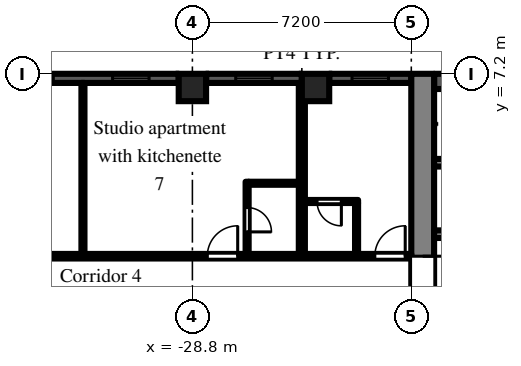
"""IFC4 building model, lengths in metres.
Left out: names, types, materials, properties, quantities, classifications, styles, units other than length and angle.
Written with IfcOpenShell. Run it as: python <this file> out.ifc"""

import sys

from ifc_helpers import new_model, si_unit, direction, frame, frame_2d, origin, origin_2d, place, context, subcontext, project, spatial, rectangle, extrude, element, fill, save


model = new_model("IFC4")
c1 = context("Model", 3, precision=1e-05, world=origin(), true_north=direction((0.0, 1.0)))
c2 = subcontext(c1, "Body", "Model", "MODEL_VIEW")
j1 = project(units=[si_unit("LENGTHUNIT", "METRE"), si_unit("PLANEANGLEUNIT", "RADIAN")], contexts=[c1])
p1 = place(None, origin())
s1 = spatial("IfcSite", under=j1, at=p1, CompositionType="ELEMENT")
p2 = place(p1, origin())
s2 = spatial("IfcBuilding", under=s1, at=p2, CompositionType="ELEMENT")
p3 = place(p2, frame((0.0, 0.0, 59.7)))
s3 = spatial("IfcBuildingStorey", under=s2, at=p3, CompositionType="ELEMENT", Elevation=59.7)
for number, where, z_axis, x_axis in (
    (1, (-28.8, 6.75, 0.0), (0.0, 0.0, 1.0), (1.0, 0.0, 0.0)),
    (2, (-24.75, 6.75, 0.0), (0.0, 0.0, 1.0), (1.0, 0.0, 0.0)),
):
    element("IfcColumn", number, at=place(p3, frame(where, z_axis=z_axis, x_axis=x_axis)), inside=s3, PredefinedType="COLUMN", context=c2, shape_type="SweptSolid", body=[
        extrude(rectangle(XDim=0.9, YDim=0.9, at=origin_2d()), origin(), (0.0, 0.0, 1.0), 3.0),
    ])
p4 = place(p3, frame((-21.6, 7.05, 0.0), z_axis=(0.0, 0.0, 1.0), x_axis=(-1.0, 0.0, 0.0)))
e3 = element("IfcWall", 3, at=p4, inside=s3, PredefinedType="SOLIDWALL", context=c2, shape_type="SweptSolid", body=[
    extrude(rectangle(XDim=2.7, YDim=0.3, at=frame_2d((1.35, 0.0))), origin(), (0.0, 0.0, 1.0), 2.1),
])
p5 = place(p4, frame((0.75, 0.0, 0.2)))
e4 = element("IfcOpeningElement", 4, at=p5, cuts=e3, PredefinedType="OPENING", context=c2, shape_type="SweptSolid", body=[
    extrude(rectangle(XDim=1.2, YDim=1.85, at=frame_2d((0.6, 0.925))), frame((0.0, 0.16, 0.0), z_axis=(0.0, -1.0, 0.0), x_axis=(1.0, 0.0, 0.0)), (0.0, 0.0, 1.0), 0.32),
])
p6 = place(p3, frame((-25.2, 7.05, 0.0), z_axis=(0.0, 0.0, 1.0), x_axis=(-1.0, 0.0, 0.0)))
e5 = element("IfcWall", 5, at=p6, inside=s3, PredefinedType="SOLIDWALL", context=c2, shape_type="SweptSolid", body=[
    extrude(rectangle(XDim=3.15, YDim=0.3, at=frame_2d((1.575, 0.0))), origin(), (0.0, 0.0, 1.0), 2.1),
])
p7 = place(p6, frame((0.975, 0.0, 0.2)))
e6 = element("IfcOpeningElement", 6, at=p7, cuts=e5, PredefinedType="OPENING", context=c2, shape_type="SweptSolid", body=[
    extrude(rectangle(XDim=1.2, YDim=1.85, at=frame_2d((0.6, 0.925))), frame((0.0, 0.16, 0.0), z_axis=(0.0, -1.0, 0.0), x_axis=(1.0, 0.0, 0.0)), (0.0, 0.0, 1.0), 0.32),
])
p8 = place(p3, frame((-29.25, 7.05, 0.0), z_axis=(0.0, 0.0, 1.0), x_axis=(-1.0, 0.0, 0.0)))
e7 = element("IfcWall", 7, at=p8, inside=s3, PredefinedType="SOLIDWALL", context=c2, shape_type="SweptSolid", body=[
    extrude(rectangle(XDim=6.3, YDim=0.3, at=frame_2d((3.15, 0.0))), origin(), (0.0, 0.0, 1.0), 2.1),
])
p9 = place(p8, frame((0.975, 0.0, 0.2)))
e8 = element("IfcOpeningElement", 8, at=p9, cuts=e7, PredefinedType="OPENING", context=c2, shape_type="SweptSolid", body=[
    extrude(rectangle(XDim=1.2, YDim=1.85, at=frame_2d((0.6, 0.925))), frame((0.0, 0.16, 0.0), z_axis=(0.0, -1.0, 0.0), x_axis=(1.0, 0.0, 0.0)), (0.0, 0.0, 1.0), 0.32),
])
p10 = place(p8, frame((4.125, 0.0, 0.2)))
e9 = element("IfcOpeningElement", 9, at=p10, cuts=e7, PredefinedType="OPENING", context=c2, shape_type="SweptSolid", body=[
    extrude(rectangle(XDim=1.2, YDim=1.85, at=frame_2d((0.6, 0.925))), frame((0.0, 0.16, 0.0), z_axis=(0.0, -1.0, 0.0), x_axis=(1.0, 0.0, 0.0)), (0.0, 0.0, 1.0), 0.32),
])
p11 = place(p3, frame((-21.225, -7.2, 0.0), z_axis=(0.0, 0.0, 1.0), x_axis=(0.0, 1.0, 0.0)))
e10 = element("IfcWall", 10, at=p11, inside=s3, PredefinedType="SHEAR", context=c2, shape_type="SweptSolid", body=[
    extrude(rectangle(XDim=14.4, YDim=0.75, at=frame_2d((7.2, 0.0))), origin(), (0.0, 0.0, 1.0), 2.55),
])
p12 = place(p11, frame((6.0, 0.0, 0.0)))
e11 = element("IfcOpeningElement", 11, at=p12, cuts=e10, PredefinedType="OPENING", context=c2, shape_type="SweptSolid", body=[
    extrude(rectangle(XDim=2.4, YDim=2.2, at=frame_2d((1.2, 1.1))), frame((0.0, 0.385, 0.0), z_axis=(0.0, -1.0, 0.0), x_axis=(1.0, 0.0, 0.0)), (0.0, 0.0, 1.0), 0.77),
])
p13 = place(p3, frame((-7.9, 6.95, 0.0), z_axis=(0.0, 0.0, 1.0), x_axis=(-1.0, 0.0, 0.0)))
e12 = element("IfcWall", 12, at=p13, inside=s3, PredefinedType="SHEAR", context=c2, shape_type="SweptSolid", body=[
    extrude(rectangle(XDim=12.95, YDim=0.5, at=frame_2d((6.475, 0.0))), origin(), (0.0, 0.0, 1.0), 2.55),
])
p14 = place(p3, frame((-7.9, 1.925, 0.0), z_axis=(0.0, 0.0, 1.0), x_axis=(-1.0, 0.0, 0.0)))
e13 = element("IfcWall", 13, at=p14, inside=s3, PredefinedType="SHEAR", context=c2, shape_type="SweptSolid", body=[
    extrude(rectangle(XDim=12.95, YDim=0.25, at=frame_2d((6.475, 0.0))), origin(), (0.0, 0.0, 1.0), 2.55),
])
p15 = place(p14, frame((0.525, 0.0, 0.0)))
e14 = element("IfcOpeningElement", 14, at=p15, cuts=e13, PredefinedType="OPENING", context=c2, shape_type="SweptSolid", body=[
    extrude(rectangle(XDim=0.9, YDim=2.1, at=frame_2d((0.45, 1.05))), frame((0.0, 0.135, 0.0), z_axis=(0.0, -1.0, 0.0), x_axis=(1.0, 0.0, 0.0)), (0.0, 0.0, 1.0), 0.27),
])
p16 = place(p14, frame((2.625, 0.0, 0.0)))
e15 = element("IfcOpeningElement", 15, at=p16, cuts=e13, PredefinedType="OPENING", context=c2, shape_type="SweptSolid", body=[
    extrude(rectangle(XDim=1.1, YDim=2.1, at=frame_2d((0.55, 1.05))), frame((0.0, 0.135, 0.0), z_axis=(0.0, -1.0, 0.0), x_axis=(1.0, 0.0, 0.0)), (0.0, 0.0, 1.0), 0.27),
])
p17 = place(p14, frame((6.025, 0.0, 0.0)))
e16 = element("IfcOpeningElement", 16, at=p17, cuts=e13, PredefinedType="OPENING", context=c2, shape_type="SweptSolid", body=[
    extrude(rectangle(XDim=0.9, YDim=2.1, at=frame_2d((0.45, 1.05))), frame((0.0, 0.135, 0.0), z_axis=(0.0, -1.0, 0.0), x_axis=(1.0, 0.0, 0.0)), (0.0, 0.0, 1.0), 0.27),
])
p18 = place(p14, frame((9.325, 0.0, 0.0)))
e17 = element("IfcOpeningElement", 17, at=p18, cuts=e13, PredefinedType="OPENING", context=c2, shape_type="SweptSolid", body=[
    extrude(rectangle(XDim=0.9, YDim=2.1, at=frame_2d((0.45, 1.05))), frame((0.0, 0.135, 0.0), z_axis=(0.0, -1.0, 0.0), x_axis=(1.0, 0.0, 0.0)), (0.0, 0.0, 1.0), 0.27),
])
p19 = place(p3, frame((-12.3, 4.275, 0.0), z_axis=(0.0, 0.0, 1.0), x_axis=(-1.0, 0.0, 0.0)))
e18 = element("IfcWall", 18, at=p19, inside=s3, PredefinedType="SHEAR", context=c2, shape_type="SweptSolid", body=[
    extrude(rectangle(XDim=8.55, YDim=0.25, at=frame_2d((4.275, 0.0))), origin(), (0.0, 0.0, 1.0), 2.55),
])
p20 = place(p3, frame((-36.5, 1.2, 0.0), z_axis=(0.0, 0.0, 1.0), x_axis=(1.0, 0.0, 0.0)))
e19 = element("IfcWall", 19, at=p20, inside=s3, PredefinedType="PARTITIONING", context=c2, shape_type="SweptSolid", body=[
    extrude(rectangle(XDim=14.9, YDim=0.15, at=frame_2d((7.45, 0.0))), origin(), (0.0, 0.0, 1.0), 2.55),
])
p21 = place(p20, frame((13.7, 0.0, 0.0)))
e20 = element("IfcOpeningElement", 20, at=p21, cuts=e19, PredefinedType="OPENING", context=c2, shape_type="SweptSolid", body=[
    extrude(rectangle(XDim=1.0, YDim=2.1, at=frame_2d((0.5, 1.05))), frame((0.0, 0.085, 0.0), z_axis=(0.0, -1.0, 0.0), x_axis=(1.0, 0.0, 0.0)), (0.0, 0.0, 1.0), 0.17),
])
p22 = place(p20, frame((8.19, 0.0, 0.0)))
e21 = element("IfcOpeningElement", 21, at=p22, cuts=e19, PredefinedType="OPENING", context=c2, shape_type="SweptSolid", body=[
    extrude(rectangle(XDim=1.0, YDim=2.1, at=frame_2d((0.5, 1.05))), frame((0.0, 0.085, 0.0), z_axis=(0.0, -1.0, 0.0), x_axis=(1.0, 0.0, 0.0)), (0.0, 0.0, 1.0), 0.17),
])
p23 = place(p20, frame((1.15, 0.0, 0.0)))
e22 = element("IfcOpeningElement", 22, at=p23, cuts=e19, PredefinedType="OPENING", context=c2, shape_type="SweptSolid", body=[
    extrude(rectangle(XDim=1.8, YDim=2.1, at=frame_2d((0.9, 1.05))), frame((0.0, 0.085, 0.0), z_axis=(0.0, -1.0, 0.0), x_axis=(1.0, 0.0, 0.0)), (0.0, 0.0, 1.0), 0.17),
])
p24 = place(p3, frame((-32.4, 1.275, 0.0), z_axis=(0.0, 0.0, 1.0), x_axis=(0.0, 1.0, 0.0)))
e23 = element("IfcWall", 23, at=p24, inside=s3, PredefinedType="PARTITIONING", context=c2, shape_type="SweptSolid", body=[
    extrude(rectangle(XDim=5.625, YDim=0.1, at=frame_2d((2.812, 0.0))), origin(), (0.0, 0.0, 1.0), 2.55),
])
p25 = place(p3, frame((-27.0, 1.275, 0.0), z_axis=(0.0, 0.0, 1.0), x_axis=(0.0, 1.0, 0.0)))
e24 = element("IfcWall", 24, at=p25, inside=s3, PredefinedType="PARTITIONING", context=c2, shape_type="SweptSolid", body=[
    extrude(rectangle(XDim=2.375, YDim=0.1, at=frame_2d((1.188, 0.0))), origin(), (0.0, 0.0, 1.0), 2.55),
])
p26 = place(p25, frame((0.725, 0.0, 0.0)))
e25 = element("IfcOpeningElement", 25, at=p26, cuts=e24, PredefinedType="OPENING", context=c2, shape_type="SweptSolid", body=[
    extrude(rectangle(XDim=0.8, YDim=2.1, at=frame_2d((0.4, 1.05))), frame((0.0, 0.06, 0.0), z_axis=(0.0, -1.0, 0.0), x_axis=(1.0, 0.0, 0.0)), (0.0, 0.0, 1.0), 0.12),
])
p27 = place(p3, frame((-26.95, 3.6, 0.0), z_axis=(0.0, 0.0, 1.0), x_axis=(1.0, 0.0, 0.0)))
e26 = element("IfcWall", 26, at=p27, inside=s3, PredefinedType="PARTITIONING", context=c2, shape_type="SweptSolid", body=[
    extrude(rectangle(XDim=1.65, YDim=0.1, at=frame_2d((0.825, 0.0))), origin(), (0.0, 0.0, 1.0), 2.55),
])
p28 = place(p3, frame((-25.2, 1.275, 0.0), z_axis=(0.0, 0.0, 1.0), x_axis=(0.0, 1.0, 0.0)))
e27 = element("IfcWall", 27, at=p28, inside=s3, PredefinedType="PARTITIONING", context=c2, shape_type="SweptSolid", body=[
    extrude(rectangle(XDim=5.625, YDim=0.2, at=frame_2d((2.812, 0.0))), origin(), (0.0, 0.0, 1.0), 2.55),
])
p29 = place(p3, frame((-25.1, 3.0, 0.0), z_axis=(0.0, 0.0, 1.0), x_axis=(1.0, 0.0, 0.0)))
e28 = element("IfcWall", 28, at=p29, inside=s3, PredefinedType="PARTITIONING", context=c2, shape_type="SweptSolid", body=[
    extrude(rectangle(XDim=1.75, YDim=0.1, at=frame_2d((0.875, 0.0))), origin(), (0.0, 0.0, 1.0), 2.55),
])
p30 = place(p29, frame((0.4, 0.0, 0.0)))
e29 = element("IfcOpeningElement", 29, at=p30, cuts=e28, PredefinedType="OPENING", context=c2, shape_type="SweptSolid", body=[
    extrude(rectangle(XDim=0.8, YDim=2.1, at=frame_2d((0.4, 1.05))), frame((0.0, 0.06, 0.0), z_axis=(0.0, -1.0, 0.0), x_axis=(1.0, 0.0, 0.0)), (0.0, 0.0, 1.0), 0.12),
])
p31 = place(p3, frame((-23.4, 1.275, 0.0), z_axis=(0.0, 0.0, 1.0), x_axis=(0.0, 1.0, 0.0)))
e30 = element("IfcWall", 30, at=p31, inside=s3, PredefinedType="PARTITIONING", context=c2, shape_type="SweptSolid", body=[
    extrude(rectangle(XDim=1.675, YDim=0.1, at=frame_2d((0.837, 0.0))), origin(), (0.0, 0.0, 1.0), 2.55),
])
p32 = place(p5, origin())
e31 = element("IfcWindow", 31, at=p32, inside=s3, PartitioningType="SINGLE_PANEL", PredefinedType="WINDOW", context=c2, shape_type="SweptSolid", body=[
    extrude(rectangle(XDim=1.2, YDim=1.85, at=frame_2d((0.6, 0.925))), frame((0.0, 0.03, 0.0), z_axis=(0.0, -1.0, 0.0), x_axis=(1.0, 0.0, 0.0)), (0.0, 0.0, 1.0), 0.06),
])
fill(e4, e31)
p33 = place(p7, origin())
e32 = element("IfcWindow", 32, at=p33, inside=s3, PartitioningType="SINGLE_PANEL", PredefinedType="WINDOW", context=c2, shape_type="SweptSolid", body=[
    extrude(rectangle(XDim=1.2, YDim=1.85, at=frame_2d((0.6, 0.925))), frame((0.0, 0.03, 0.0), z_axis=(0.0, -1.0, 0.0), x_axis=(1.0, 0.0, 0.0)), (0.0, 0.0, 1.0), 0.06),
])
fill(e6, e32)
p34 = place(p9, origin())
e33 = element("IfcWindow", 33, at=p34, inside=s3, PartitioningType="SINGLE_PANEL", PredefinedType="WINDOW", context=c2, shape_type="SweptSolid", body=[
    extrude(rectangle(XDim=1.2, YDim=1.85, at=frame_2d((0.6, 0.925))), frame((0.0, 0.03, 0.0), z_axis=(0.0, -1.0, 0.0), x_axis=(1.0, 0.0, 0.0)), (0.0, 0.0, 1.0), 0.06),
])
fill(e8, e33)
p35 = place(p10, origin())
e34 = element("IfcWindow", 34, at=p35, inside=s3, PartitioningType="SINGLE_PANEL", PredefinedType="WINDOW", context=c2, shape_type="SweptSolid", body=[
    extrude(rectangle(XDim=1.2, YDim=1.85, at=frame_2d((0.6, 0.925))), frame((0.0, 0.03, 0.0), z_axis=(0.0, -1.0, 0.0), x_axis=(1.0, 0.0, 0.0)), (0.0, 0.0, 1.0), 0.06),
])
fill(e9, e34)
p36 = place(p12, frame((2.4, 0.0, 0.0), z_axis=(0.0, 0.0, 1.0), x_axis=(-1.0, 0.0, 0.0)))
e35 = element("IfcDoor", 35, at=p36, inside=s3, OperationType="DOUBLE_DOOR_DOUBLE_SWING", PredefinedType="DOOR", context=c2, shape_type="SweptSolid", body=[
    extrude(rectangle(XDim=2.4, YDim=2.2, at=frame_2d((1.2, 1.1))), frame((0.0, 0.025, 0.0), z_axis=(0.0, -1.0, 0.0), x_axis=(1.0, 0.0, 0.0)), (0.0, 0.0, 1.0), 0.05),
])
fill(e11, e35)
p37 = place(p30, frame((0.8, 0.0, 0.0), z_axis=(0.0, 0.0, 1.0), x_axis=(-1.0, 0.0, 0.0)))
e36 = element("IfcDoor", 36, at=p37, inside=s3, OperationType="SINGLE_SWING_LEFT", PredefinedType="DOOR", context=c2, shape_type="SweptSolid", body=[
    extrude(rectangle(XDim=0.8, YDim=2.1, at=frame_2d((0.4, 1.05))), frame((0.0, 0.025, 0.0), z_axis=(0.0, -1.0, 0.0), x_axis=(1.0, 0.0, 0.0)), (0.0, 0.0, 1.0), 0.05),
])
fill(e29, e36)
p38 = place(p21, origin())
e37 = element("IfcDoor", 37, at=p38, inside=s3, OperationType="SINGLE_SWING_RIGHT", PredefinedType="DOOR", context=c2, shape_type="SweptSolid", body=[
    extrude(rectangle(XDim=1.0, YDim=2.1, at=frame_2d((0.5, 1.05))), frame((0.0, 0.025, 0.0), z_axis=(0.0, -1.0, 0.0), x_axis=(1.0, 0.0, 0.0)), (0.0, 0.0, 1.0), 0.05),
])
fill(e20, e37)
p39 = place(p26, frame((0.8, 0.0, 0.0), z_axis=(0.0, 0.0, 1.0), x_axis=(-1.0, 0.0, 0.0)))
e38 = element("IfcDoor", 38, at=p39, inside=s3, OperationType="SINGLE_SWING_RIGHT", PredefinedType="DOOR", context=c2, shape_type="SweptSolid", body=[
    extrude(rectangle(XDim=0.8, YDim=2.1, at=frame_2d((0.4, 1.05))), frame((0.0, 0.025, 0.0), z_axis=(0.0, -1.0, 0.0), x_axis=(1.0, 0.0, 0.0)), (0.0, 0.0, 1.0), 0.05),
])
fill(e25, e38)
p40 = place(p22, origin())
e39 = element("IfcDoor", 39, at=p40, inside=s3, OperationType="SINGLE_SWING_RIGHT", PredefinedType="DOOR", context=c2, shape_type="SweptSolid", body=[
    extrude(rectangle(XDim=1.0, YDim=2.1, at=frame_2d((0.5, 1.05))), frame((0.0, 0.025, 0.0), z_axis=(0.0, -1.0, 0.0), x_axis=(1.0, 0.0, 0.0)), (0.0, 0.0, 1.0), 0.05),
])
fill(e21, e39)
save(model, sys.argv[1])
